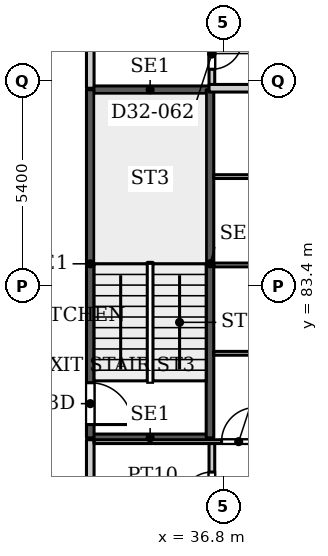
"""IFC4 building model, lengths in metres.
Left out: names, types, materials, properties, quantities, classifications, styles, units other than length and angle.
Written with IfcOpenShell. Run it as: python <this file> out.ifc"""

import sys

from ifc_helpers import new_model, si_unit, direction, frame, frame_2d, origin, place, context, subcontext, project, spatial, rectangle, extrude, source, transform, mapped, element, fill, save


model = new_model("IFC4")
c1 = context("Model", 3, precision=1e-05, world=origin(), true_north=direction((0.0, 1.0)))
c2 = subcontext(c1, "Body", "Model", "MODEL_VIEW")
j1 = project(units=[si_unit("LENGTHUNIT", "METRE"), si_unit("PLANEANGLEUNIT", "RADIAN")], contexts=[c1])
p1 = place(None, origin())
s1 = spatial("IfcSite", under=j1, at=p1, CompositionType="ELEMENT")
p2 = place(p1, origin())
s2 = spatial("IfcBuilding", under=s1, at=p2, CompositionType="ELEMENT")
p3 = place(p2, frame((0.0, 0.0, 137.0)))
s3 = spatial("IfcBuildingStorey", under=s2, at=p3, CompositionType="ELEMENT", Elevation=137.0)
for number, where, z_axis, x_axis in (
    (1, (33.3, 79.4, 0.0), (0.0, 0.0, 1.0), (1.0, 0.0, 0.0)),
    (2, (33.3, 88.56, 0.0), (0.0, 0.0, 1.0), (1.0, 0.0, 0.0)),
):
    element("IfcWall", number, at=place(p3, frame(where, z_axis=z_axis, x_axis=x_axis)), inside=s3, PredefinedType="SHEAR", context=c2, shape_type="SweptSolid", body=[
        extrude(rectangle(XDim=3.15, YDim=0.2, at=frame_2d((1.575, 0.0))), origin(), (0.0, 0.0, 1.0), 3.9),
    ])
p4 = place(p3, frame((33.3, 79.4, 0.0), z_axis=(0.0, 0.0, 1.0), x_axis=(0.0, 1.0, 0.0)))
e3 = element("IfcWall", 3, at=p4, inside=s3, PredefinedType="SHEAR", context=c2, shape_type="SweptSolid", body=[
    extrude(rectangle(XDim=9.16, YDim=0.2, at=frame_2d((4.58, 0.0))), origin(), (0.0, 0.0, 1.0), 3.9),
])
p5 = place(p4, frame((0.35, 0.0, 0.0)))
e4 = element("IfcOpeningElement", 4, at=p5, cuts=e3, PredefinedType="OPENING", context=c2, shape_type="SweptSolid", body=[
    extrude(rectangle(XDim=1.1, YDim=2.2, at=frame_2d((0.55, 1.1))), frame((0.0, 0.11, 0.0), z_axis=(0.0, -1.0, 0.0), x_axis=(1.0, 0.0, 0.0)), (0.0, 0.0, 1.0), 0.22),
])
p6 = place(p3, frame((36.45, 79.4, 0.0), z_axis=(0.0, 0.0, 1.0), x_axis=(0.0, 1.0, 0.0)))
e5 = element("IfcWall", 5, at=p6, inside=s3, PredefinedType="SHEAR", context=c2, shape_type="SweptSolid", body=[
    extrude(rectangle(XDim=9.16, YDim=0.2, at=frame_2d((4.58, 0.0))), origin(), (0.0, 0.0, 1.0), 3.9),
])
p7 = place(p3, frame((33.3, 54.4, 0.0), z_axis=(0.0, 0.0, 1.0), x_axis=(0.0, 1.0, 0.0)))
e6 = element("IfcWall", 6, at=p7, inside=s3, PredefinedType="PARTITIONING", context=c2, shape_type="SweptSolid", body=[
    extrude(rectangle(XDim=24.95, YDim=0.2, at=frame_2d((12.475, 0.0))), origin(), (0.0, 0.0, 1.0), 3.6),
])
p8 = place(p7, frame((11.5, 0.0, 0.0)))
e7 = element("IfcOpeningElement", 7, at=p8, cuts=e6, PredefinedType="OPENING", context=c2, shape_type="SweptSolid", body=[
    extrude(rectangle(XDim=1.0, YDim=2.1, at=frame_2d((0.5, 1.05))), frame((0.0, 0.11, 0.0), z_axis=(0.0, -1.0, 0.0), x_axis=(1.0, 0.0, 0.0)), (0.0, 0.0, 1.0), 0.22),
])
p9 = place(p7, frame((18.7, 0.0, 0.0)))
e8 = element("IfcOpeningElement", 8, at=p9, cuts=e6, PredefinedType="OPENING", context=c2, shape_type="SweptSolid", body=[
    extrude(rectangle(XDim=1.0, YDim=2.1, at=frame_2d((0.5, 1.05))), frame((0.0, 0.11, 0.0), z_axis=(0.0, -1.0, 0.0), x_axis=(1.0, 0.0, 0.0)), (0.0, 0.0, 1.0), 0.22),
])
p10 = place(p3, frame((33.3, 88.6, 0.0), z_axis=(0.0, 0.0, 1.0), x_axis=(0.0, 1.0, 0.0)))
e9 = element("IfcWall", 9, at=p10, inside=s3, PredefinedType="PARTITIONING", context=c2, shape_type="SweptSolid", body=[
    extrude(rectangle(XDim=5.5, YDim=0.2, at=frame_2d((2.75, 0.0))), origin(), (0.0, 0.0, 1.0), 3.6),
])
p11 = place(p10, frame((2.2, 0.0, 0.0)))
e10 = element("IfcOpeningElement", 10, at=p11, cuts=e9, PredefinedType="OPENING", context=c2, shape_type="SweptSolid", body=[
    extrude(rectangle(XDim=1.0, YDim=2.1, at=frame_2d((0.5, 1.05))), frame((0.0, 0.11, 0.0), z_axis=(0.0, -1.0, 0.0), x_axis=(1.0, 0.0, 0.0)), (0.0, 0.0, 1.0), 0.22),
])
p12 = place(p3, frame((33.4, 79.3, 0.0), z_axis=(0.0, 0.0, 1.0), x_axis=(1.0, 0.0, 0.0)))
e11 = element("IfcWall", 11, at=p12, inside=s3, PredefinedType="PARTITIONING", context=c2, shape_type="SweptSolid", body=[
    extrude(rectangle(XDim=12.5, YDim=0.1, at=frame_2d((6.25, 0.0))), origin(), (0.0, 0.0, 1.0), 3.6),
])
p13 = place(p12, frame((3.355, 0.0, 0.0)))
e12 = element("IfcOpeningElement", 12, at=p13, cuts=e11, PredefinedType="OPENING", context=c2, shape_type="SweptSolid", body=[
    extrude(rectangle(XDim=0.9, YDim=2.1, at=frame_2d((0.45, 1.05))), frame((0.0, 0.06, 0.0), z_axis=(0.0, -1.0, 0.0), x_axis=(1.0, 0.0, 0.0)), (0.0, 0.0, 1.0), 0.12),
])
p14 = place(p3, frame((36.425, 88.6, 0.0), z_axis=(0.0, 0.0, 1.0), x_axis=(1.0, 0.0, 0.0)))
e13 = element("IfcWall", 13, at=p14, inside=s3, PredefinedType="PARTITIONING", context=c2, shape_type="SweptSolid", body=[
    extrude(rectangle(XDim=9.475, YDim=0.2, at=frame_2d((4.737, 0.0))), origin(), (0.0, 0.0, 1.0), 2.5),
])
p15 = place(p3, frame((36.5, 74.425, 0.0), z_axis=(0.0, 0.0, 1.0), x_axis=(0.0, 1.0, 0.0)))
e14 = element("IfcWall", 14, at=p15, inside=s3, PredefinedType="PARTITIONING", context=c2, shape_type="SweptSolid", body=[
    extrude(rectangle(XDim=4.825, YDim=0.15, at=frame_2d((2.413, 0.0))), origin(), (0.0, 0.0, 1.0), 3.6),
])
p16 = place(p15, frame((0.875, 0.0, 0.0)))
e15 = element("IfcOpeningElement", 15, at=p16, cuts=e14, PredefinedType="OPENING", context=c2, shape_type="SweptSolid", body=[
    extrude(rectangle(XDim=0.8, YDim=2.1, at=frame_2d((0.4, 1.05))), frame((0.0, 0.085, 0.0), z_axis=(0.0, -1.0, 0.0), x_axis=(1.0, 0.0, 0.0)), (0.0, 0.0, 1.0), 0.17),
])
p17 = place(p15, frame((3.275, 0.0, 0.0)))
e16 = element("IfcOpeningElement", 16, at=p17, cuts=e14, PredefinedType="OPENING", context=c2, shape_type="SweptSolid", body=[
    extrude(rectangle(XDim=0.8, YDim=2.1, at=frame_2d((0.4, 1.05))), frame((0.0, 0.085, 0.0), z_axis=(0.0, -1.0, 0.0), x_axis=(1.0, 0.0, 0.0)), (0.0, 0.0, 1.0), 0.17),
])
p18 = place(p3, frame((36.5, 88.7, 0.0), z_axis=(0.0, 0.0, 1.0), x_axis=(0.0, 1.0, 0.0)))
e17 = element("IfcWall", 17, at=p18, inside=s3, PredefinedType="PARTITIONING", context=c2, shape_type="SweptSolid", body=[
    extrude(rectangle(XDim=1.625, YDim=0.15, at=frame_2d((0.812, 0.0))), origin(), (0.0, 0.0, 1.0), 3.6),
])
p19 = place(p18, frame((0.4, 0.0, 0.0)))
e18 = element("IfcOpeningElement", 18, at=p19, cuts=e17, PredefinedType="OPENING", context=c2, shape_type="SweptSolid", body=[
    extrude(rectangle(XDim=0.8, YDim=2.1, at=frame_2d((0.4, 1.05))), frame((0.0, 0.085, 0.0), z_axis=(0.0, -1.0, 0.0), x_axis=(1.0, 0.0, 0.0)), (0.0, 0.0, 1.0), 0.17),
])
p20 = place(p3, frame((36.549, 81.625, 0.0), z_axis=(0.0, 0.0, 1.0), x_axis=(1.0, 0.0, 0.0)))
e19 = element("IfcWall", 19, at=p20, inside=s3, PredefinedType="PARTITIONING", context=c2, shape_type="SweptSolid", body=[
    extrude(rectangle(XDim=9.351, YDim=0.1, at=frame_2d((4.675, 0.0))), origin(), (0.0, 0.0, 1.0), 3.6),
])
p21 = place(p20, frame((4.176, 0.0, 0.0)))
e20 = element("IfcOpeningElement", 20, at=p21, cuts=e19, PredefinedType="OPENING", context=c2, shape_type="SweptSolid", body=[
    extrude(rectangle(XDim=0.9, YDim=2.1, at=frame_2d((0.45, 1.05))), frame((0.0, 0.06, 0.0), z_axis=(0.0, -1.0, 0.0), x_axis=(1.0, 0.0, 0.0)), (0.0, 0.0, 1.0), 0.12),
])
p22 = place(p3, frame((36.549, 83.95, 0.0), z_axis=(0.0, 0.0, 1.0), x_axis=(1.0, 0.0, 0.0)))
e21 = element("IfcWall", 21, at=p22, inside=s3, PredefinedType="PARTITIONING", context=c2, shape_type="SweptSolid", body=[
    extrude(rectangle(XDim=9.351, YDim=0.1, at=frame_2d((4.675, 0.0))), origin(), (0.0, 0.0, 1.0), 3.6),
])
p23 = place(p22, frame((4.176, 0.0, 0.0)))
e22 = element("IfcOpeningElement", 22, at=p23, cuts=e21, PredefinedType="OPENING", context=c2, shape_type="SweptSolid", body=[
    extrude(rectangle(XDim=0.9, YDim=2.1, at=frame_2d((0.45, 1.05))), frame((0.0, 0.06, 0.0), z_axis=(0.0, -1.0, 0.0), x_axis=(1.0, 0.0, 0.0)), (0.0, 0.0, 1.0), 0.12),
])
p24 = place(p3, frame((36.549, 86.275, 0.0), z_axis=(0.0, 0.0, 1.0), x_axis=(1.0, 0.0, 0.0)))
e23 = element("IfcWall", 23, at=p24, inside=s3, PredefinedType="PARTITIONING", context=c2, shape_type="SweptSolid", body=[
    extrude(rectangle(XDim=9.351, YDim=0.1, at=frame_2d((4.675, 0.0))), origin(), (0.0, 0.0, 1.0), 3.6),
])
p25 = place(p24, frame((4.176, 0.0, 0.0)))
e24 = element("IfcOpeningElement", 24, at=p25, cuts=e23, PredefinedType="OPENING", context=c2, shape_type="SweptSolid", body=[
    extrude(rectangle(XDim=0.9, YDim=2.1, at=frame_2d((0.45, 1.05))), frame((0.0, 0.06, 0.0), z_axis=(0.0, -1.0, 0.0), x_axis=(1.0, 0.0, 0.0)), (0.0, 0.0, 1.0), 0.12),
])
m1 = source(origin(), c2, "Body", "SweptSolid", [
    extrude(rectangle(XDim=1.1, YDim=2.2, at=frame_2d((0.55, 1.1))), frame((0.0, 0.025, 0.0), z_axis=(0.0, -1.0, 0.0), x_axis=(1.0, 0.0, 0.0)), (0.0, 0.0, 1.0), 0.05),
])
p26 = place(p5, origin())
e25 = element("IfcDoor", 25, at=p26, inside=s3, OperationType="SINGLE_SWING_RIGHT", PredefinedType="DOOR", context=c2, shape_type="MappedRepresentation", body=[
    mapped(m1, transform((0.0, 0.0, 0.0), x_axis=(1.0, 0.0, 0.0), y_axis=(0.0, 1.0, 0.0), z_axis=(0.0, 0.0, 1.0), scale=1.0)),
])
fill(e4, e25)
m2 = source(origin(), c2, "Body", "SweptSolid", [
    extrude(rectangle(XDim=0.8, YDim=2.1, at=frame_2d((0.4, 1.05))), frame((0.0, 0.025, 0.0), z_axis=(0.0, -1.0, 0.0), x_axis=(1.0, 0.0, 0.0)), (0.0, 0.0, 1.0), 0.05),
])
p27 = place(p17, origin())
e26 = element("IfcDoor", 26, at=p27, inside=s3, OperationType="SINGLE_SWING_LEFT", PredefinedType="DOOR", context=c2, shape_type="MappedRepresentation", body=[
    mapped(m2, transform((0.0, 0.0, 0.0), x_axis=(1.0, 0.0, 0.0), y_axis=(0.0, 1.0, 0.0), z_axis=(0.0, 0.0, 1.0), scale=1.0)),
])
fill(e16, e26)
m3 = source(origin(), c2, "Body", "SweptSolid", [
    extrude(rectangle(XDim=0.9, YDim=2.1, at=frame_2d((0.45, 1.05))), frame((0.0, 0.025, 0.0), z_axis=(0.0, -1.0, 0.0), x_axis=(1.0, 0.0, 0.0)), (0.0, 0.0, 1.0), 0.05),
])
p28 = place(p13, origin())
e27 = element("IfcDoor", 27, at=p28, inside=s3, OperationType="SINGLE_SWING_LEFT", PredefinedType="DOOR", context=c2, shape_type="MappedRepresentation", body=[
    mapped(m3, transform((0.0, 0.0, 0.0), x_axis=(1.0, 0.0, 0.0), y_axis=(0.0, 1.0, 0.0), z_axis=(0.0, 0.0, 1.0), scale=1.0)),
])
fill(e12, e27)
p29 = place(p19, origin())
e28 = element("IfcDoor", 28, at=p29, inside=s3, OperationType="SINGLE_SWING_RIGHT", PredefinedType="DOOR", context=c2, shape_type="MappedRepresentation", body=[
    mapped(m2, transform((0.0, 0.0, 0.0), x_axis=(1.0, 0.0, 0.0), y_axis=(0.0, 1.0, 0.0), z_axis=(0.0, 0.0, 1.0), scale=1.0)),
])
fill(e18, e28)
save(model, sys.argv[1])
